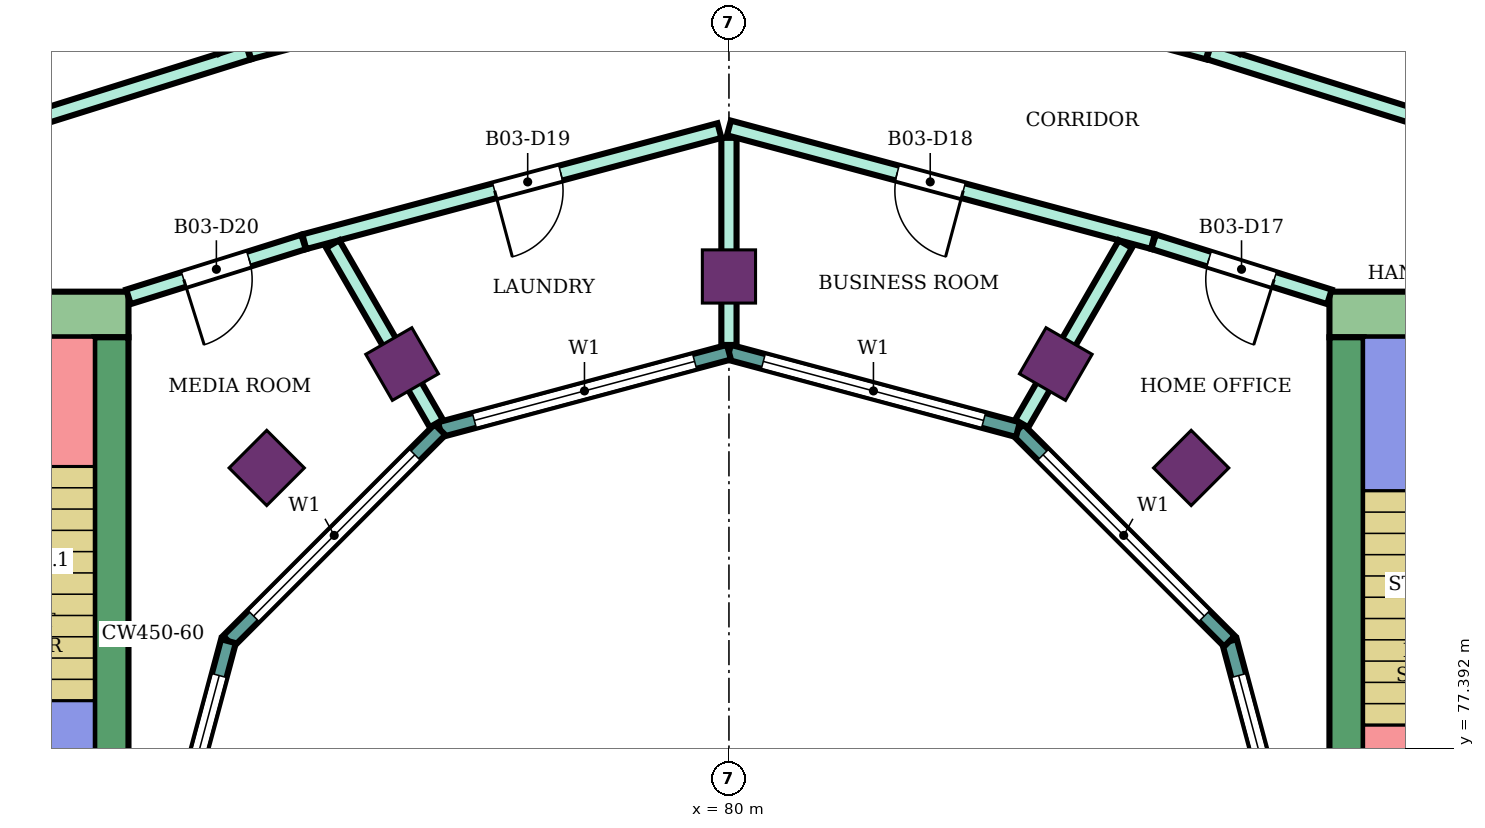
"""IFC4 building model, lengths in metres.
Left out: names, types, materials, properties, quantities, classifications, styles, units other than length and angle.
Written with IfcOpenShell. Run it as: python <this file> out.ifc"""

import sys

from ifc_helpers import new_model, si_unit, direction, frame, frame_2d, origin, origin_2d, place, context, subcontext, project, spatial, rectangle, extrude, element, fill, save


model = new_model("IFC4")
c1 = context("Model", 3, precision=1e-05, world=origin(), true_north=direction((0.0, 1.0)))
c2 = subcontext(c1, "Body", "Model", "MODEL_VIEW")
j1 = project(units=[si_unit("LENGTHUNIT", "METRE"), si_unit("PLANEANGLEUNIT", "RADIAN")], contexts=[c1])
p1 = place(None, origin())
s1 = spatial("IfcSite", under=j1, at=p1, CompositionType="ELEMENT")
p2 = place(p1, origin())
s2 = spatial("IfcBuilding", under=s1, at=p2, CompositionType="ELEMENT")
p3 = place(p2, frame((0.0, 0.0, 237.3)))
s3 = spatial("IfcBuildingStorey", under=s2, at=p3, CompositionType="ELEMENT", Elevation=237.3)
for number, where, z_axis, x_axis in (
    (1, (86.081, 81.081, 0.0), (0.0, 0.0, 1.0), (0.707, 0.707, 0.0)),
    (2, (84.3, 82.448, 0.0), (0.0, 0.0, 1.0), (0.5, 0.866, 0.0)),
    (3, (80.0, 83.6, 0.0), (0.0, 0.0, 1.0), (0.0, 1.0, 0.0)),
    (4, (75.7, 82.448, 0.0), (0.0, 0.0, 1.0), (-0.5, 0.866, 0.0)),
    (5, (73.919, 81.081, 0.0), (0.0, 0.0, 1.0), (-0.707, 0.707, 0.0)),
):
    element("IfcColumn", number, at=place(p3, frame(where, z_axis=z_axis, x_axis=x_axis)), inside=s3, PredefinedType="COLUMN", context=c2, shape_type="SweptSolid", body=[
        extrude(rectangle(XDim=0.7, YDim=0.7, at=origin_2d()), origin(), (0.0, 0.0, 1.0), 4.2),
    ])
p4 = place(p3, frame((87.9, 83.1, 0.0), z_axis=(0.0, 0.0, 1.0), x_axis=(1.0, 0.0, 0.0)))
e6 = element("IfcWall", 6, at=p4, inside=s3, PredefinedType="SHEAR", context=c2, shape_type="SweptSolid", body=[
    extrude(rectangle(XDim=14.9, YDim=0.6, at=frame_2d((7.45, 0.0))), origin(), (0.0, 0.0, 1.0), 3.88),
])
p5 = place(p4, frame((4.2, 0.0, 0.0)))
e7 = element("IfcOpeningElement", 7, at=p5, cuts=e6, PredefinedType="OPENING", context=c2, shape_type="SweptSolid", body=[
    extrude(rectangle(XDim=2.4, YDim=2.4, at=frame_2d((1.2, 1.2))), frame((0.0, 0.31, 0.0), z_axis=(0.0, -1.0, 0.0), x_axis=(1.0, 0.0, 0.0)), (0.0, 0.0, 1.0), 0.62),
])
p6 = place(p3, frame((88.125, 75.0, 0.0), z_axis=(0.0, 0.0, 1.0), x_axis=(0.0, 1.0, 0.0)))
e8 = element("IfcWall", 8, at=p6, inside=s3, PredefinedType="SHEAR", context=c2, shape_type="SweptSolid", body=[
    extrude(rectangle(XDim=7.8, YDim=0.45, at=frame_2d((3.9, 0.0))), origin(), (0.0, 0.0, 1.0), 3.88),
])
p7 = place(p3, frame((72.1, 83.1, 0.0), z_axis=(0.0, 0.0, 1.0), x_axis=(-1.0, 0.0, 0.0)))
e9 = element("IfcWall", 9, at=p7, inside=s3, PredefinedType="SHEAR", context=c2, shape_type="SweptSolid", body=[
    extrude(rectangle(XDim=14.9, YDim=0.6, at=frame_2d((7.45, 0.0))), origin(), (0.0, 0.0, 1.0), 3.88),
])
p8 = place(p7, frame((4.2, 0.0, 0.0)))
e10 = element("IfcOpeningElement", 10, at=p8, cuts=e9, PredefinedType="OPENING", context=c2, shape_type="SweptSolid", body=[
    extrude(rectangle(XDim=2.4, YDim=2.4, at=frame_2d((1.2, 1.2))), frame((0.0, 0.31, 0.0), z_axis=(0.0, -1.0, 0.0), x_axis=(1.0, 0.0, 0.0)), (0.0, 0.0, 1.0), 0.62),
])
p9 = place(p3, frame((71.875, 82.8, 0.0), z_axis=(0.0, 0.0, 1.0), x_axis=(0.0, -1.0, 0.0)))
e11 = element("IfcWall", 11, at=p9, inside=s3, PredefinedType="SHEAR", context=c2, shape_type="SweptSolid", body=[
    extrude(rectangle(XDim=7.8, YDim=0.45, at=frame_2d((3.9, 0.0))), origin(), (0.0, 0.0, 1.0), 3.88),
])
p10 = place(p3, frame((87.604, 75.0, 0.0), z_axis=(0.0, 0.0, 1.0), x_axis=(-0.258789828301, 0.965933654434, 0.0)))
e12 = element("IfcWall", 12, at=p10, inside=s3, PredefinedType="NOTDEFINED", context=c2, shape_type="SweptSolid", body=[
    extrude(rectangle(XDim=3.936, YDim=0.2, at=frame_2d((1.968, 0.0))), origin(), (0.0, 0.0, 1.0), 4.2),
])
p11 = place(p10, frame((0.468, 0.0, 0.9)))
e13 = element("IfcOpeningElement", 13, at=p11, cuts=e12, PredefinedType="OPENING", context=c2, shape_type="SweptSolid", body=[
    extrude(rectangle(XDim=3.0, YDim=2.3, at=frame_2d((1.5, 1.15))), frame((0.0, 0.11, 0.0), z_axis=(0.0, -1.0, 0.0), x_axis=(1.0, 0.0, 0.0)), (0.0, 0.0, 1.0), 0.22),
])
p12 = place(p3, frame((86.585, 78.802, 0.0), z_axis=(0.0, 0.0, 1.0), x_axis=(-0.707106781187, 0.707106781187, 0.0)))
e14 = element("IfcWall", 14, at=p12, inside=s3, PredefinedType="NOTDEFINED", context=c2, shape_type="SweptSolid", body=[
    extrude(rectangle(XDim=3.936, YDim=0.2, at=frame_2d((1.968, 0.0))), origin(), (0.0, 0.0, 1.0), 4.2),
])
p13 = place(p12, frame((0.468, 0.0, 0.9)))
e15 = element("IfcOpeningElement", 15, at=p13, cuts=e14, PredefinedType="OPENING", context=c2, shape_type="SweptSolid", body=[
    extrude(rectangle(XDim=3.0, YDim=2.3, at=frame_2d((1.5, 1.15))), frame((0.0, 0.11, 0.0), z_axis=(0.0, -1.0, 0.0), x_axis=(1.0, 0.0, 0.0)), (0.0, 0.0, 1.0), 0.22),
])
p14 = place(p3, frame((83.802, 81.585, 0.0), z_axis=(0.0, 0.0, 1.0), x_axis=(-0.965933654434, 0.258789828301, 0.0)))
e16 = element("IfcWall", 16, at=p14, inside=s3, PredefinedType="NOTDEFINED", context=c2, shape_type="SweptSolid", body=[
    extrude(rectangle(XDim=3.936, YDim=0.2, at=frame_2d((1.968, 0.0))), origin(), (0.0, 0.0, 1.0), 4.2),
])
p15 = place(p14, frame((0.468, 0.0, 0.9)))
e17 = element("IfcOpeningElement", 17, at=p15, cuts=e16, PredefinedType="OPENING", context=c2, shape_type="SweptSolid", body=[
    extrude(rectangle(XDim=3.0, YDim=2.3, at=frame_2d((1.5, 1.15))), frame((0.0, 0.11, 0.0), z_axis=(0.0, -1.0, 0.0), x_axis=(1.0, 0.0, 0.0)), (0.0, 0.0, 1.0), 0.22),
])
p16 = place(p3, frame((80.0, 82.604, 0.0), z_axis=(0.0, 0.0, 1.0), x_axis=(-0.965933654434, -0.258789828301, 0.0)))
e18 = element("IfcWall", 18, at=p16, inside=s3, PredefinedType="NOTDEFINED", context=c2, shape_type="SweptSolid", body=[
    extrude(rectangle(XDim=3.936, YDim=0.2, at=frame_2d((1.968, 0.0))), origin(), (0.0, 0.0, 1.0), 4.2),
])
p17 = place(p16, frame((0.468, 0.0, 0.9)))
e19 = element("IfcOpeningElement", 19, at=p17, cuts=e18, PredefinedType="OPENING", context=c2, shape_type="SweptSolid", body=[
    extrude(rectangle(XDim=3.0, YDim=2.3, at=frame_2d((1.5, 1.15))), frame((0.0, 0.11, 0.0), z_axis=(0.0, -1.0, 0.0), x_axis=(1.0, 0.0, 0.0)), (0.0, 0.0, 1.0), 0.22),
])
p18 = place(p3, frame((76.198, 81.585, 0.0), z_axis=(0.0, 0.0, 1.0), x_axis=(-0.707106781187, -0.707106781187, 0.0)))
e20 = element("IfcWall", 20, at=p18, inside=s3, PredefinedType="NOTDEFINED", context=c2, shape_type="SweptSolid", body=[
    extrude(rectangle(XDim=3.936, YDim=0.2, at=frame_2d((1.968, 0.0))), origin(), (0.0, 0.0, 1.0), 4.2),
])
p19 = place(p18, frame((0.468, 0.0, 0.9)))
e21 = element("IfcOpeningElement", 21, at=p19, cuts=e20, PredefinedType="OPENING", context=c2, shape_type="SweptSolid", body=[
    extrude(rectangle(XDim=3.0, YDim=2.3, at=frame_2d((1.5, 1.15))), frame((0.0, 0.11, 0.0), z_axis=(0.0, -1.0, 0.0), x_axis=(1.0, 0.0, 0.0)), (0.0, 0.0, 1.0), 0.22),
])
p20 = place(p3, frame((73.415, 78.802, 0.0), z_axis=(0.0, 0.0, 1.0), x_axis=(-0.258789828301, -0.965933654434, 0.0)))
e22 = element("IfcWall", 22, at=p20, inside=s3, PredefinedType="NOTDEFINED", context=c2, shape_type="SweptSolid", body=[
    extrude(rectangle(XDim=3.936, YDim=0.2, at=frame_2d((1.968, 0.0))), origin(), (0.0, 0.0, 1.0), 4.2),
])
p21 = place(p20, frame((0.468, 0.0, 0.9)))
e23 = element("IfcOpeningElement", 23, at=p21, cuts=e22, PredefinedType="OPENING", context=c2, shape_type="SweptSolid", body=[
    extrude(rectangle(XDim=3.0, YDim=2.3, at=frame_2d((1.5, 1.15))), frame((0.0, 0.11, 0.0), z_axis=(0.0, -1.0, 0.0), x_axis=(1.0, 0.0, 0.0)), (0.0, 0.0, 1.0), 0.22),
])
p22 = place(p3, frame((68.2, 84.834, 0.0), z_axis=(0.0, 0.0, 1.0), x_axis=(0.954272398161, 0.298938438661, 0.0)))
e24 = element("IfcWall", 24, at=p22, inside=s3, PredefinedType="PARTITIONING", context=c2, shape_type="SweptSolid", body=[
    extrude(rectangle(XDim=5.74, YDim=0.2, at=frame_2d((2.87, 0.0))), origin(), (0.0, 0.0, 1.0), 3.75),
])
p23 = place(p3, frame((72.1, 83.332, 0.0), z_axis=(0.0, 0.0, 1.0), x_axis=(0.954233106619, 0.299063836383, 0.0)))
e25 = element("IfcWall", 25, at=p23, inside=s3, PredefinedType="PARTITIONING", context=c2, shape_type="SweptSolid", body=[
    extrude(rectangle(XDim=2.414, YDim=0.2, at=frame_2d((1.207, 0.0))), origin(), (0.0, 0.0, 1.0), 3.75),
])
p24 = place(p23, frame((0.762, 0.0, 0.0)))
e26 = element("IfcOpeningElement", 26, at=p24, cuts=e25, PredefinedType="OPENING", context=c2, shape_type="SweptSolid", body=[
    extrude(rectangle(XDim=0.9, YDim=2.1, at=frame_2d((0.45, 1.05))), frame((0.0, 0.11, 0.0), z_axis=(0.0, -1.0, 0.0), x_axis=(1.0, 0.0, 0.0)), (0.0, 0.0, 1.0), 0.22),
])
p25 = place(p3, frame((73.687, 86.554, 0.0), z_axis=(0.0, 0.0, 1.0), x_axis=(0.96595928904, 0.258694128106, 0.0)))
e27 = element("IfcWall", 27, at=p25, inside=s3, PredefinedType="PARTITIONING", context=c2, shape_type="SweptSolid", body=[
    extrude(rectangle(XDim=6.496, YDim=0.2, at=frame_2d((3.248, 0.0))), origin(), (0.0, 0.0, 1.0), 3.75),
])
p26 = place(p25, frame((0.55, 0.0, 0.0)))
e28 = element("IfcOpeningElement", 28, at=p26, cuts=e27, PredefinedType="OPENING", context=c2, shape_type="SweptSolid", body=[
    extrude(rectangle(XDim=1.0, YDim=2.1, at=frame_2d((0.5, 1.05))), frame((0.0, 0.11, 0.0), z_axis=(0.0, -1.0, 0.0), x_axis=(1.0, 0.0, 0.0)), (0.0, 0.0, 1.0), 0.22),
])
p27 = place(p3, frame((74.413, 84.057, 0.0), z_axis=(0.0, 0.0, 1.0), x_axis=(0.965972135939, 0.258646153246, 0.0)))
e29 = element("IfcWall", 29, at=p27, inside=s3, PredefinedType="PARTITIONING", context=c2, shape_type="SweptSolid", body=[
    extrude(rectangle(XDim=5.654, YDim=0.2, at=frame_2d((2.827, 0.0))), origin(), (0.0, 0.0, 1.0), 3.75),
])
p28 = place(p27, frame((2.593, 0.0, 0.0)))
e30 = element("IfcOpeningElement", 30, at=p28, cuts=e29, PredefinedType="OPENING", context=c2, shape_type="SweptSolid", body=[
    extrude(rectangle(XDim=0.9, YDim=2.1, at=frame_2d((0.45, 1.05))), frame((0.0, 0.11, 0.0), z_axis=(0.0, -1.0, 0.0), x_axis=(1.0, 0.0, 0.0)), (0.0, 0.0, 1.0), 0.22),
])
p29 = place(p3, frame((74.787, 84.027, 0.0), z_axis=(0.0, 0.0, 1.0), x_axis=(0.500079107518, -0.86597972622, 0.0)))
e31 = element("IfcWall", 31, at=p29, inside=s3, PredefinedType="PARTITIONING", context=c2, shape_type="SweptSolid", body=[
    extrude(rectangle(XDim=2.726, YDim=0.2, at=frame_2d((1.363, 0.0))), origin(), (0.0, 0.0, 1.0), 3.75),
])
p30 = place(p3, frame((80.0, 82.699, 0.0), z_axis=(0.0, 0.0, 1.0), x_axis=(0.0, 1.0, 0.0)))
e32 = element("IfcWall", 32, at=p30, inside=s3, PredefinedType="PARTITIONING", context=c2, shape_type="SweptSolid", body=[
    extrude(rectangle(XDim=2.725, YDim=0.2, at=frame_2d((1.363, 0.0))), origin(), (0.0, 0.0, 1.0), 3.75),
])
p31 = place(p3, frame((80.0, 85.554, 0.0), z_axis=(0.0, 0.0, 1.0), x_axis=(0.965928989968, -0.258807237802, 0.0)))
e33 = element("IfcWall", 33, at=p31, inside=s3, PredefinedType="PARTITIONING", context=c2, shape_type="SweptSolid", body=[
    extrude(rectangle(XDim=5.774, YDim=0.2, at=frame_2d((2.887, 0.0))), origin(), (0.0, 0.0, 1.0), 3.75),
])
p32 = place(p31, frame((2.292, 0.0, 0.0)))
e34 = element("IfcOpeningElement", 34, at=p32, cuts=e33, PredefinedType="OPENING", context=c2, shape_type="SweptSolid", body=[
    extrude(rectangle(XDim=0.9, YDim=2.1, at=frame_2d((0.45, 1.05))), frame((0.0, 0.11, 0.0), z_axis=(0.0, -1.0, 0.0), x_axis=(1.0, 0.0, 0.0)), (0.0, 0.0, 1.0), 0.22),
])
p33 = place(p3, frame((80.049, 88.237, 0.0), z_axis=(0.0, 0.0, 1.0), x_axis=(0.965582990495, -0.260095152718, 0.0)))
e35 = element("IfcWall", 35, at=p33, inside=s3, PredefinedType="PARTITIONING", context=c2, shape_type="SweptSolid", body=[
    extrude(rectangle(XDim=6.476, YDim=0.2, at=frame_2d((3.238, 0.0))), origin(), (0.0, 0.0, 1.0), 3.75),
])
p34 = place(p33, frame((0.5, 0.0, 0.0)))
e36 = element("IfcOpeningElement", 36, at=p34, cuts=e35, PredefinedType="OPENING", context=c2, shape_type="SweptSolid", body=[
    extrude(rectangle(XDim=1.0, YDim=2.1, at=frame_2d((0.5, 1.05))), frame((0.0, 0.11, 0.0), z_axis=(0.0, -1.0, 0.0), x_axis=(1.0, 0.0, 0.0)), (0.0, 0.0, 1.0), 0.22),
])
p35 = place(p3, frame((83.852, 81.665, 0.0), z_axis=(0.0, 0.0, 1.0), x_axis=(0.500185068774, 0.865918527909, 0.0)))
e37 = element("IfcWall", 37, at=p35, inside=s3, PredefinedType="PARTITIONING", context=c2, shape_type="SweptSolid", body=[
    extrude(rectangle(XDim=2.726, YDim=0.2, at=frame_2d((1.363, 0.0))), origin(), (0.0, 0.0, 1.0), 3.75),
])
p36 = place(p3, frame((85.587, 84.057, 0.0), z_axis=(0.0, 0.0, 1.0), x_axis=(0.954239513179, -0.299043393987, 0.0)))
e38 = element("IfcWall", 38, at=p36, inside=s3, PredefinedType="PARTITIONING", context=c2, shape_type="SweptSolid", body=[
    extrude(rectangle(XDim=2.424, YDim=0.2, at=frame_2d((1.212, 0.0))), origin(), (0.0, 0.0, 1.0), 3.75),
])
p37 = place(p36, frame((0.762, 0.0, 0.0)))
e39 = element("IfcOpeningElement", 39, at=p37, cuts=e38, PredefinedType="OPENING", context=c2, shape_type="SweptSolid", body=[
    extrude(rectangle(XDim=0.9, YDim=2.1, at=frame_2d((0.45, 1.05))), frame((0.0, 0.11, 0.0), z_axis=(0.0, -1.0, 0.0), x_axis=(1.0, 0.0, 0.0)), (0.0, 0.0, 1.0), 0.22),
])
p38 = place(p3, frame((86.313, 86.554, 0.0), z_axis=(0.0, 0.0, 1.0), x_axis=(0.954081217458, -0.299548043717, 0.0)))
e40 = element("IfcWall", 40, at=p38, inside=s3, PredefinedType="PARTITIONING", context=c2, shape_type="SweptSolid", body=[
    extrude(rectangle(XDim=5.721, YDim=0.2, at=frame_2d((2.86, 0.0))), origin(), (0.0, 0.0, 1.0), 3.75),
])
p39 = place(p3, frame((67.104, 97.343, 0.0), z_axis=(0.0, 0.0, 1.0), x_axis=(0.499891560959, -0.866088002043, 0.0)))
e41 = element("IfcWall", 41, at=p39, inside=s3, PredefinedType="PARTITIONING", context=c2, shape_type="SweptSolid", body=[
    extrude(rectangle(XDim=12.456, YDim=0.1, at=frame_2d((6.228, 0.0))), origin(), (0.0, 0.0, 1.0), 3.75),
])
p40 = place(p39, frame((2.538, 0.0, 0.0)))
e42 = element("IfcOpeningElement", 42, at=p40, cuts=e41, PredefinedType="OPENING", context=c2, shape_type="SweptSolid", body=[
    extrude(rectangle(XDim=0.9, YDim=2.1, at=frame_2d((0.45, 1.05))), frame((0.0, 0.06, 0.0), z_axis=(0.0, -1.0, 0.0), x_axis=(1.0, 0.0, 0.0)), (0.0, 0.0, 1.0), 0.12),
])
p41 = place(p39, frame((9.697, 0.0, 0.0)))
e43 = element("IfcOpeningElement", 43, at=p41, cuts=e41, PredefinedType="OPENING", context=c2, shape_type="SweptSolid", body=[
    extrude(rectangle(XDim=0.8, YDim=2.1, at=frame_2d((0.4, 1.05))), frame((0.0, 0.06, 0.0), z_axis=(0.0, -1.0, 0.0), x_axis=(1.0, 0.0, 0.0)), (0.0, 0.0, 1.0), 0.12),
])
p42 = place(p3, frame((86.671, 86.554, 0.0), z_axis=(0.0, 0.0, 1.0), x_axis=(0.500104188531, 0.865965242151, 0.0)))
e44 = element("IfcWall", 44, at=p42, inside=s3, PredefinedType="PARTITIONING", context=c2, shape_type="SweptSolid", body=[
    extrude(rectangle(XDim=12.456, YDim=0.1, at=frame_2d((6.228, 0.0))), origin(), (0.0, 0.0, 1.0), 3.75),
])
p43 = place(p42, frame((9.111, 0.0, 0.0)))
e45 = element("IfcOpeningElement", 45, at=p43, cuts=e44, PredefinedType="OPENING", context=c2, shape_type="SweptSolid", body=[
    extrude(rectangle(XDim=0.9, YDim=2.1, at=frame_2d((0.45, 1.05))), frame((0.0, 0.06, 0.0), z_axis=(0.0, -1.0, 0.0), x_axis=(1.0, 0.0, 0.0)), (0.0, 0.0, 1.0), 0.12),
])
p44 = place(p11, origin())
e46 = element("IfcWindow", 46, at=p44, inside=s3, PartitioningType="SINGLE_PANEL", PredefinedType="WINDOW", context=c2, shape_type="SweptSolid", body=[
    extrude(rectangle(XDim=3.0, YDim=2.3, at=frame_2d((1.5, 1.15))), frame((0.0, 0.03, 0.0), z_axis=(0.0, -1.0, 0.0), x_axis=(1.0, 0.0, 0.0)), (0.0, 0.0, 1.0), 0.06),
])
fill(e13, e46)
p45 = place(p13, origin())
e47 = element("IfcWindow", 47, at=p45, inside=s3, PartitioningType="SINGLE_PANEL", PredefinedType="WINDOW", context=c2, shape_type="SweptSolid", body=[
    extrude(rectangle(XDim=3.0, YDim=2.3, at=frame_2d((1.5, 1.15))), frame((0.0, 0.03, 0.0), z_axis=(0.0, -1.0, 0.0), x_axis=(1.0, 0.0, 0.0)), (0.0, 0.0, 1.0), 0.06),
])
fill(e15, e47)
p46 = place(p15, origin())
e48 = element("IfcWindow", 48, at=p46, inside=s3, PartitioningType="SINGLE_PANEL", PredefinedType="WINDOW", context=c2, shape_type="SweptSolid", body=[
    extrude(rectangle(XDim=3.0, YDim=2.3, at=frame_2d((1.5, 1.15))), frame((0.0, 0.03, 0.0), z_axis=(0.0, -1.0, 0.0), x_axis=(1.0, 0.0, 0.0)), (0.0, 0.0, 1.0), 0.06),
])
fill(e17, e48)
p47 = place(p17, origin())
e49 = element("IfcWindow", 49, at=p47, inside=s3, PartitioningType="SINGLE_PANEL", PredefinedType="WINDOW", context=c2, shape_type="SweptSolid", body=[
    extrude(rectangle(XDim=3.0, YDim=2.3, at=frame_2d((1.5, 1.15))), frame((0.0, 0.03, 0.0), z_axis=(0.0, -1.0, 0.0), x_axis=(1.0, 0.0, 0.0)), (0.0, 0.0, 1.0), 0.06),
])
fill(e19, e49)
p48 = place(p19, origin())
e50 = element("IfcWindow", 50, at=p48, inside=s3, PartitioningType="SINGLE_PANEL", PredefinedType="WINDOW", context=c2, shape_type="SweptSolid", body=[
    extrude(rectangle(XDim=3.0, YDim=2.3, at=frame_2d((1.5, 1.15))), frame((0.0, 0.03, 0.0), z_axis=(0.0, -1.0, 0.0), x_axis=(1.0, 0.0, 0.0)), (0.0, 0.0, 1.0), 0.06),
])
fill(e21, e50)
p49 = place(p21, origin())
e51 = element("IfcWindow", 51, at=p49, inside=s3, PartitioningType="SINGLE_PANEL", PredefinedType="WINDOW", context=c2, shape_type="SweptSolid", body=[
    extrude(rectangle(XDim=3.0, YDim=2.3, at=frame_2d((1.5, 1.15))), frame((0.0, 0.03, 0.0), z_axis=(0.0, -1.0, 0.0), x_axis=(1.0, 0.0, 0.0)), (0.0, 0.0, 1.0), 0.06),
])
fill(e23, e51)
p50 = place(p37, frame((0.9, 0.0, 0.0), z_axis=(0.0, 0.0, 1.0), x_axis=(-1.0, 0.0, 0.0)))
e52 = element("IfcDoor", 52, at=p50, inside=s3, OperationType="SINGLE_SWING_LEFT", PredefinedType="DOOR", context=c2, shape_type="SweptSolid", body=[
    extrude(rectangle(XDim=0.9, YDim=2.1, at=frame_2d((0.45, 1.05))), frame((0.0, 0.025, 0.0), z_axis=(0.0, -1.0, 0.0), x_axis=(1.0, 0.0, 0.0)), (0.0, 0.0, 1.0), 0.05),
])
fill(e39, e52)
p51 = place(p32, frame((0.9, 0.0, 0.0), z_axis=(0.0, 0.0, 1.0), x_axis=(-1.0, 0.0, 0.0)))
e53 = element("IfcDoor", 53, at=p51, inside=s3, OperationType="SINGLE_SWING_LEFT", PredefinedType="DOOR", context=c2, shape_type="SweptSolid", body=[
    extrude(rectangle(XDim=0.9, YDim=2.1, at=frame_2d((0.45, 1.05))), frame((0.0, 0.025, 0.0), z_axis=(0.0, -1.0, 0.0), x_axis=(1.0, 0.0, 0.0)), (0.0, 0.0, 1.0), 0.05),
])
fill(e34, e53)
p52 = place(p28, frame((0.9, 0.0, 0.0), z_axis=(0.0, 0.0, 1.0), x_axis=(-1.0, 0.0, 0.0)))
e54 = element("IfcDoor", 54, at=p52, inside=s3, OperationType="SINGLE_SWING_RIGHT", PredefinedType="DOOR", context=c2, shape_type="SweptSolid", body=[
    extrude(rectangle(XDim=0.9, YDim=2.1, at=frame_2d((0.45, 1.05))), frame((0.0, 0.025, 0.0), z_axis=(0.0, -1.0, 0.0), x_axis=(1.0, 0.0, 0.0)), (0.0, 0.0, 1.0), 0.05),
])
fill(e30, e54)
p53 = place(p24, frame((0.9, 0.0, 0.0), z_axis=(0.0, 0.0, 1.0), x_axis=(-1.0, 0.0, 0.0)))
e55 = element("IfcDoor", 55, at=p53, inside=s3, OperationType="SINGLE_SWING_RIGHT", PredefinedType="DOOR", context=c2, shape_type="SweptSolid", body=[
    extrude(rectangle(XDim=0.9, YDim=2.1, at=frame_2d((0.45, 1.05))), frame((0.0, 0.025, 0.0), z_axis=(0.0, -1.0, 0.0), x_axis=(1.0, 0.0, 0.0)), (0.0, 0.0, 1.0), 0.05),
])
fill(e26, e55)
save(model, sys.argv[1])
